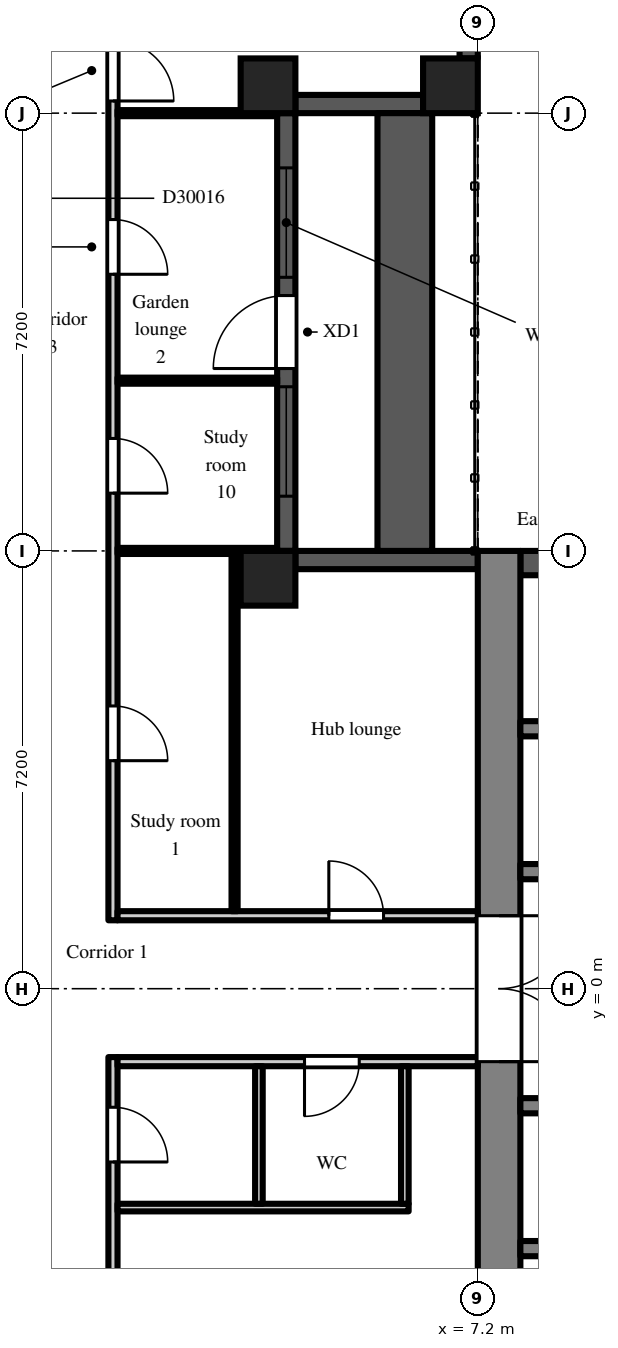
"""IFC4 building model, lengths in metres.
Left out: names, types, materials, properties, quantities, classifications, styles, units other than length and angle.
Written with IfcOpenShell. Run it as: python <this file> out.ifc"""

import sys

from ifc_helpers import new_model, si_unit, direction, frame, frame_2d, origin, origin_2d, place, context, subcontext, project, spatial, rectangle, extrude, element, fill, save


model = new_model("IFC4")
c1 = context("Model", 3, precision=1e-05, world=origin(), true_north=direction((0.0, 1.0)))
c2 = subcontext(c1, "Body", "Model", "MODEL_VIEW")
j1 = project(units=[si_unit("LENGTHUNIT", "METRE"), si_unit("PLANEANGLEUNIT", "RADIAN")], contexts=[c1])
p1 = place(None, origin())
s1 = spatial("IfcSite", under=j1, at=p1, CompositionType="ELEMENT")
p2 = place(p1, origin())
s2 = spatial("IfcBuilding", under=s1, at=p2, CompositionType="ELEMENT")
p3 = place(p2, frame((0.0, 0.0, 207.9)))
s3 = spatial("IfcBuildingStorey", under=s2, at=p3, CompositionType="ELEMENT", Elevation=207.9)
for number, where, z_axis, x_axis in (
    (1, (3.75, 6.75, 0.0), (0.0, 0.0, 1.0), (1.0, 0.0, 0.0)),
    (2, (3.75, 14.85, 0.0), (0.0, 0.0, 1.0), (1.0, 0.0, 0.0)),
    (3, (6.75, 14.85, 0.0), (0.0, 0.0, 1.0), (1.0, 0.0, 0.0)),
):
    element("IfcColumn", number, at=place(p3, frame(where, z_axis=z_axis, x_axis=x_axis)), inside=s3, PredefinedType="COLUMN", context=c2, shape_type="SweptSolid", body=[
        extrude(rectangle(XDim=0.9, YDim=0.9, at=origin_2d()), origin(), (0.0, 0.0, 1.0), 3.0),
    ])
p4 = place(p3, frame((7.2, 7.05, 0.0), z_axis=(0.0, 0.0, 1.0), x_axis=(-1.0, 0.0, 0.0)))
e4 = element("IfcWall", 4, at=p4, inside=s3, PredefinedType="SOLIDWALL", context=c2, shape_type="SweptSolid", body=[
    extrude(rectangle(XDim=3.0, YDim=0.3, at=frame_2d((1.5, 0.0))), origin(), (0.0, 0.0, 1.0), 2.3),
])
p5 = place(p3, frame((4.05, 7.2, 0.0), z_axis=(0.0, 0.0, 1.0), x_axis=(0.0, 1.0, 0.0)))
e5 = element("IfcWall", 5, at=p5, inside=s3, PredefinedType="SOLIDWALL", context=c2, shape_type="SweptSolid", body=[
    extrude(rectangle(XDim=7.2, YDim=0.3, at=frame_2d((3.6, 0.0))), origin(), (0.0, 0.0, 1.0), 2.3),
])
p6 = place(p5, frame((3.0, 0.0, 0.0)))
e6 = element("IfcOpeningElement", 6, at=p6, cuts=e5, PredefinedType="OPENING", context=c2, shape_type="SweptSolid", body=[
    extrude(rectangle(XDim=1.2, YDim=2.05, at=frame_2d((0.6, 1.025))), frame((0.0, 0.16, 0.0), z_axis=(0.0, -1.0, 0.0), x_axis=(1.0, 0.0, 0.0)), (0.0, 0.0, 1.0), 0.32),
])
p7 = place(p5, frame((0.9, 0.0, 0.2)))
e7 = element("IfcOpeningElement", 7, at=p7, cuts=e5, PredefinedType="OPENING", context=c2, shape_type="SweptSolid", body=[
    extrude(rectangle(XDim=1.8, YDim=1.85, at=frame_2d((0.9, 0.925))), frame((0.0, 0.16, 0.0), z_axis=(0.0, -1.0, 0.0), x_axis=(1.0, 0.0, 0.0)), (0.0, 0.0, 1.0), 0.32),
])
p8 = place(p5, frame((4.5, 0.0, 0.2)))
e8 = element("IfcOpeningElement", 8, at=p8, cuts=e5, PredefinedType="OPENING", context=c2, shape_type="SweptSolid", body=[
    extrude(rectangle(XDim=1.8, YDim=1.85, at=frame_2d((0.9, 0.925))), frame((0.0, 0.16, 0.0), z_axis=(0.0, -1.0, 0.0), x_axis=(1.0, 0.0, 0.0)), (0.0, 0.0, 1.0), 0.32),
])
p9 = place(p3, frame((4.2, 14.55, 0.0), z_axis=(0.0, 0.0, 1.0), x_axis=(1.0, 0.0, 0.0)))
e9 = element("IfcWall", 9, at=p9, inside=s3, PredefinedType="SOLIDWALL", context=c2, shape_type="SweptSolid", body=[
    extrude(rectangle(XDim=2.1, YDim=0.3, at=frame_2d((1.05, 0.0))), origin(), (0.0, 0.0, 1.0), 2.3),
])
p10 = place(p3, frame((7.05, 15.3, 0.0), z_axis=(0.0, 0.0, 1.0), x_axis=(0.0, 1.0, 0.0)))
e10 = element("IfcWall", 10, at=p10, inside=s3, PredefinedType="SOLIDWALL", context=c2, shape_type="SweptSolid", body=[
    extrude(rectangle(XDim=1.8, YDim=0.3, at=frame_2d((0.9, 0.0))), origin(), (0.0, 0.0, 1.0), 2.3),
])
p11 = place(p10, frame((0.3, 0.0, 0.2)))
e11 = element("IfcOpeningElement", 11, at=p11, cuts=e10, PredefinedType="OPENING", context=c2, shape_type="SweptSolid", body=[
    extrude(rectangle(XDim=1.2, YDim=1.85, at=frame_2d((0.6, 0.925))), frame((0.0, 0.16, 0.0), z_axis=(0.0, -1.0, 0.0), x_axis=(1.0, 0.0, 0.0)), (0.0, 0.0, 1.0), 0.32),
])
p12 = place(p3, frame((6.0, 7.2, 0.0), z_axis=(0.0, 0.0, 1.0), x_axis=(0.0, 1.0, 0.0)))
e12 = element("IfcWall", 12, at=p12, inside=s3, PredefinedType="PARAPET", context=c2, shape_type="SweptSolid", body=[
    extrude(rectangle(XDim=7.2, YDim=0.9, at=frame_2d((3.6, 0.0))), origin(), (0.0, 0.0, 1.0), 0.8),
])
p13 = place(p3, frame((7.55, -7.2, 0.0), z_axis=(0.0, 0.0, 1.0), x_axis=(0.0, 1.0, 0.0)))
e13 = element("IfcWall", 13, at=p13, inside=s3, PredefinedType="SHEAR", context=c2, shape_type="SweptSolid", body=[
    extrude(rectangle(XDim=14.4, YDim=0.7, at=frame_2d((7.2, 0.0))), origin(), (0.0, 0.0, 1.0), 2.6),
])
p14 = place(p13, frame((6.0, 0.0, 0.0)))
e14 = element("IfcOpeningElement", 14, at=p14, cuts=e13, PredefinedType="OPENING", context=c2, shape_type="SweptSolid", body=[
    extrude(rectangle(XDim=2.4, YDim=2.2, at=frame_2d((1.2, 1.1))), frame((0.0, 0.36, 0.0), z_axis=(0.0, -1.0, 0.0), x_axis=(1.0, 0.0, 0.0)), (0.0, 0.0, 1.0), 0.72),
])
p15 = place(p3, frame((7.9, 7.0, 0.0), z_axis=(0.0, 0.0, 1.0), x_axis=(1.0, 0.0, 0.0)))
e15 = element("IfcWall", 15, at=p15, inside=s3, PredefinedType="SHEAR", context=c2, shape_type="SweptSolid", body=[
    extrude(rectangle(XDim=12.95, YDim=0.4, at=frame_2d((6.475, 0.0))), origin(), (0.0, 0.0, 1.0), 2.6),
])
p16 = place(p3, frame((7.9, 1.925, 0.0), z_axis=(0.0, 0.0, 1.0), x_axis=(1.0, 0.0, 0.0)))
e16 = element("IfcWall", 16, at=p16, inside=s3, PredefinedType="SHEAR", context=c2, shape_type="SweptSolid", body=[
    extrude(rectangle(XDim=12.95, YDim=0.25, at=frame_2d((6.475, 0.0))), origin(), (0.0, 0.0, 1.0), 2.6),
])
p17 = place(p16, frame((4.825, 0.0, 0.0)))
e17 = element("IfcOpeningElement", 17, at=p17, cuts=e16, PredefinedType="OPENING", context=c2, shape_type="SweptSolid", body=[
    extrude(rectangle(XDim=1.1, YDim=2.1, at=frame_2d((0.55, 1.05))), frame((0.0, 0.135, 0.0), z_axis=(0.0, -1.0, 0.0), x_axis=(1.0, 0.0, 0.0)), (0.0, 0.0, 1.0), 0.27),
])
p18 = place(p16, frame((7.025, 0.0, 0.0)))
e18 = element("IfcOpeningElement", 18, at=p18, cuts=e16, PredefinedType="OPENING", context=c2, shape_type="SweptSolid", body=[
    extrude(rectangle(XDim=1.1, YDim=2.1, at=frame_2d((0.55, 1.05))), frame((0.0, 0.135, 0.0), z_axis=(0.0, -1.0, 0.0), x_axis=(1.0, 0.0, 0.0)), (0.0, 0.0, 1.0), 0.27),
])
p19 = place(p16, frame((9.225, 0.0, 0.0)))
e19 = element("IfcOpeningElement", 19, at=p19, cuts=e16, PredefinedType="OPENING", context=c2, shape_type="SweptSolid", body=[
    extrude(rectangle(XDim=1.1, YDim=2.1, at=frame_2d((0.55, 1.05))), frame((0.0, 0.135, 0.0), z_axis=(0.0, -1.0, 0.0), x_axis=(1.0, 0.0, 0.0)), (0.0, 0.0, 1.0), 0.27),
])
p20 = place(p16, frame((0.525, 0.0, 0.0)))
e20 = element("IfcOpeningElement", 20, at=p20, cuts=e16, PredefinedType="OPENING", context=c2, shape_type="SweptSolid", body=[
    extrude(rectangle(XDim=0.9, YDim=2.1, at=frame_2d((0.45, 1.05))), frame((0.0, 0.135, 0.0), z_axis=(0.0, -1.0, 0.0), x_axis=(1.0, 0.0, 0.0)), (0.0, 0.0, 1.0), 0.27),
])
p21 = place(p16, frame((2.625, 0.0, 0.0)))
e21 = element("IfcOpeningElement", 21, at=p21, cuts=e16, PredefinedType="OPENING", context=c2, shape_type="SweptSolid", body=[
    extrude(rectangle(XDim=1.1, YDim=2.1, at=frame_2d((0.55, 1.05))), frame((0.0, 0.135, 0.0), z_axis=(0.0, -1.0, 0.0), x_axis=(1.0, 0.0, 0.0)), (0.0, 0.0, 1.0), 0.27),
])
p22 = place(p16, frame((11.525, 0.0, 0.0)))
e22 = element("IfcOpeningElement", 22, at=p22, cuts=e16, PredefinedType="OPENING", context=c2, shape_type="SweptSolid", body=[
    extrude(rectangle(XDim=0.9, YDim=2.1, at=frame_2d((0.45, 1.05))), frame((0.0, 0.135, 0.0), z_axis=(0.0, -1.0, 0.0), x_axis=(1.0, 0.0, 0.0)), (0.0, 0.0, 1.0), 0.27),
])
p23 = place(p3, frame((7.9, 4.275, 0.0), z_axis=(0.0, 0.0, 1.0), x_axis=(1.0, 0.0, 0.0)))
e23 = element("IfcWall", 23, at=p23, inside=s3, PredefinedType="SHEAR", context=c2, shape_type="SweptSolid", body=[
    extrude(rectangle(XDim=1.95, YDim=0.25, at=frame_2d((0.975, 0.0))), origin(), (0.0, 0.0, 1.0), 2.6),
])
p24 = place(p3, frame((7.9, -1.925, 0.0), z_axis=(0.0, 0.0, 1.0), x_axis=(1.0, 0.0, 0.0)))
e24 = element("IfcWall", 24, at=p24, inside=s3, PredefinedType="SHEAR", context=c2, shape_type="SweptSolid", body=[
    extrude(rectangle(XDim=12.95, YDim=0.25, at=frame_2d((6.475, 0.0))), origin(), (0.0, 0.0, 1.0), 2.6),
])
p25 = place(p24, frame((0.525, 0.0, 0.0)))
e25 = element("IfcOpeningElement", 25, at=p25, cuts=e24, PredefinedType="OPENING", context=c2, shape_type="SweptSolid", body=[
    extrude(rectangle(XDim=0.9, YDim=2.1, at=frame_2d((0.45, 1.05))), frame((0.0, 0.135, 0.0), z_axis=(0.0, -1.0, 0.0), x_axis=(1.0, 0.0, 0.0)), (0.0, 0.0, 1.0), 0.27),
])
p26 = place(p24, frame((2.625, 0.0, 0.0)))
e26 = element("IfcOpeningElement", 26, at=p26, cuts=e24, PredefinedType="OPENING", context=c2, shape_type="SweptSolid", body=[
    extrude(rectangle(XDim=1.1, YDim=2.1, at=frame_2d((0.55, 1.05))), frame((0.0, 0.135, 0.0), z_axis=(0.0, -1.0, 0.0), x_axis=(1.0, 0.0, 0.0)), (0.0, 0.0, 1.0), 0.27),
])
p27 = place(p24, frame((4.925, 0.0, 0.0)))
e27 = element("IfcOpeningElement", 27, at=p27, cuts=e24, PredefinedType="OPENING", context=c2, shape_type="SweptSolid", body=[
    extrude(rectangle(XDim=0.9, YDim=2.1, at=frame_2d((0.45, 1.05))), frame((0.0, 0.135, 0.0), z_axis=(0.0, -1.0, 0.0), x_axis=(1.0, 0.0, 0.0)), (0.0, 0.0, 1.0), 0.27),
])
p28 = place(p24, frame((8.225, 0.0, 0.0)))
e28 = element("IfcOpeningElement", 28, at=p28, cuts=e24, PredefinedType="OPENING", context=c2, shape_type="SweptSolid", body=[
    extrude(rectangle(XDim=0.9, YDim=2.1, at=frame_2d((0.45, 1.05))), frame((0.0, 0.135, 0.0), z_axis=(0.0, -1.0, 0.0), x_axis=(1.0, 0.0, 0.0)), (0.0, 0.0, 1.0), 0.27),
])
p29 = place(p24, frame((11.525, 0.0, 0.0)))
e29 = element("IfcOpeningElement", 29, at=p29, cuts=e24, PredefinedType="OPENING", context=c2, shape_type="SweptSolid", body=[
    extrude(rectangle(XDim=0.9, YDim=2.1, at=frame_2d((0.45, 1.05))), frame((0.0, 0.135, 0.0), z_axis=(0.0, -1.0, 0.0), x_axis=(1.0, 0.0, 0.0)), (0.0, 0.0, 1.0), 0.27),
])
p30 = place(p3, frame((7.9, -4.275, 0.0), z_axis=(0.0, 0.0, 1.0), x_axis=(1.0, 0.0, 0.0)))
e30 = element("IfcWall", 30, at=p30, inside=s3, PredefinedType="SHEAR", context=c2, shape_type="SweptSolid", body=[
    extrude(rectangle(XDim=1.95, YDim=0.25, at=frame_2d((0.975, 0.0))), origin(), (0.0, 0.0, 1.0), 2.6),
])
p31 = place(p3, frame((1.2, -19.525, 0.0), z_axis=(0.0, 0.0, 1.0), x_axis=(0.0, 1.0, 0.0)))
e31 = element("IfcWall", 31, at=p31, inside=s3, PredefinedType="PARTITIONING", context=c2, shape_type="SweptSolid", body=[
    extrude(rectangle(XDim=18.4, YDim=0.15, at=frame_2d((9.2, 0.0))), origin(), (0.0, 0.0, 1.0), 2.6),
])
p32 = place(p31, frame((16.675, 0.0, 0.0)))
e32 = element("IfcOpeningElement", 32, at=p32, cuts=e31, PredefinedType="OPENING", context=c2, shape_type="SweptSolid", body=[
    extrude(rectangle(XDim=0.9, YDim=2.1, at=frame_2d((0.45, 1.05))), frame((0.0, 0.085, 0.0), z_axis=(0.0, -1.0, 0.0), x_axis=(1.0, 0.0, 0.0)), (0.0, 0.0, 1.0), 0.17),
])
p33 = place(p31, frame((13.675, 0.0, 0.0)))
e33 = element("IfcOpeningElement", 33, at=p33, cuts=e31, PredefinedType="OPENING", context=c2, shape_type="SweptSolid", body=[
    extrude(rectangle(XDim=0.9, YDim=2.1, at=frame_2d((0.45, 1.05))), frame((0.0, 0.085, 0.0), z_axis=(0.0, -1.0, 0.0), x_axis=(1.0, 0.0, 0.0)), (0.0, 0.0, 1.0), 0.17),
])
p34 = place(p31, frame((6.475, 0.0, 0.0)))
e34 = element("IfcOpeningElement", 34, at=p34, cuts=e31, PredefinedType="OPENING", context=c2, shape_type="SweptSolid", body=[
    extrude(rectangle(XDim=0.9, YDim=2.1, at=frame_2d((0.45, 1.05))), frame((0.0, 0.085, 0.0), z_axis=(0.0, -1.0, 0.0), x_axis=(1.0, 0.0, 0.0)), (0.0, 0.0, 1.0), 0.17),
])
p35 = place(p31, frame((1.625, 0.0, 0.0)))
e35 = element("IfcOpeningElement", 35, at=p35, cuts=e31, PredefinedType="OPENING", context=c2, shape_type="SweptSolid", body=[
    extrude(rectangle(XDim=1.8, YDim=2.1, at=frame_2d((0.9, 1.05))), frame((0.0, 0.085, 0.0), z_axis=(0.0, -1.0, 0.0), x_axis=(1.0, 0.0, 0.0)), (0.0, 0.0, 1.0), 0.17),
])
p36 = place(p3, frame((1.275, -3.6, 0.0), z_axis=(0.0, 0.0, 1.0), x_axis=(1.0, 0.0, 0.0)))
e36 = element("IfcWall", 36, at=p36, inside=s3, PredefinedType="PARTITIONING", context=c2, shape_type="SweptSolid", body=[
    extrude(rectangle(XDim=4.788, YDim=0.125, at=frame_2d((2.394, 0.0))), origin(), (0.0, 0.0, 1.0), 2.6),
])
p37 = place(p3, frame((1.275, -1.2, 0.0), z_axis=(0.0, 0.0, 1.0), x_axis=(1.0, 0.0, 0.0)))
e37 = element("IfcWall", 37, at=p37, inside=s3, PredefinedType="PARTITIONING", context=c2, shape_type="SweptSolid", body=[
    extrude(rectangle(XDim=5.925, YDim=0.15, at=frame_2d((2.962, 0.0))), origin(), (0.0, 0.0, 1.0), 2.6),
])
p38 = place(p37, frame((3.075, 0.0, 0.0)))
e38 = element("IfcOpeningElement", 38, at=p38, cuts=e37, PredefinedType="OPENING", context=c2, shape_type="SweptSolid", body=[
    extrude(rectangle(XDim=0.9, YDim=2.1, at=frame_2d((0.45, 1.05))), frame((0.0, 0.085, 0.0), z_axis=(0.0, -1.0, 0.0), x_axis=(1.0, 0.0, 0.0)), (0.0, 0.0, 1.0), 0.17),
])
p39 = place(p3, frame((1.2, 1.125, 0.0), z_axis=(0.0, 0.0, 1.0), x_axis=(0.0, 1.0, 0.0)))
e39 = element("IfcWall", 39, at=p39, inside=s3, PredefinedType="PARTITIONING", context=c2, shape_type="SweptSolid", body=[
    extrude(rectangle(XDim=18.4, YDim=0.15, at=frame_2d((9.2, 0.0))), origin(), (0.0, 0.0, 1.0), 2.6),
])
p40 = place(p39, frame((2.625, 0.0, 0.0)))
e40 = element("IfcOpeningElement", 40, at=p40, cuts=e39, PredefinedType="OPENING", context=c2, shape_type="SweptSolid", body=[
    extrude(rectangle(XDim=0.9, YDim=2.1, at=frame_2d((0.45, 1.05))), frame((0.0, 0.085, 0.0), z_axis=(0.0, -1.0, 0.0), x_axis=(1.0, 0.0, 0.0)), (0.0, 0.0, 1.0), 0.17),
])
p41 = place(p39, frame((7.025, 0.0, 0.0)))
e41 = element("IfcOpeningElement", 41, at=p41, cuts=e39, PredefinedType="OPENING", context=c2, shape_type="SweptSolid", body=[
    extrude(rectangle(XDim=0.9, YDim=2.1, at=frame_2d((0.45, 1.05))), frame((0.0, 0.085, 0.0), z_axis=(0.0, -1.0, 0.0), x_axis=(1.0, 0.0, 0.0)), (0.0, 0.0, 1.0), 0.17),
])
p42 = place(p39, frame((10.625, 0.0, 0.0)))
e42 = element("IfcOpeningElement", 42, at=p42, cuts=e39, PredefinedType="OPENING", context=c2, shape_type="SweptSolid", body=[
    extrude(rectangle(XDim=0.9, YDim=2.1, at=frame_2d((0.45, 1.05))), frame((0.0, 0.085, 0.0), z_axis=(0.0, -1.0, 0.0), x_axis=(1.0, 0.0, 0.0)), (0.0, 0.0, 1.0), 0.17),
])
p43 = place(p39, frame((13.475, 0.0, 0.0)))
e43 = element("IfcOpeningElement", 43, at=p43, cuts=e39, PredefinedType="OPENING", context=c2, shape_type="SweptSolid", body=[
    extrude(rectangle(XDim=1.0, YDim=2.1, at=frame_2d((0.5, 1.05))), frame((0.0, 0.085, 0.0), z_axis=(0.0, -1.0, 0.0), x_axis=(1.0, 0.0, 0.0)), (0.0, 0.0, 1.0), 0.17),
])
p44 = place(p3, frame((1.275, 1.2, 0.0), z_axis=(0.0, 0.0, 1.0), x_axis=(1.0, 0.0, 0.0)))
e44 = element("IfcWall", 44, at=p44, inside=s3, PredefinedType="PARTITIONING", context=c2, shape_type="SweptSolid", body=[
    extrude(rectangle(XDim=5.925, YDim=0.15, at=frame_2d((2.962, 0.0))), origin(), (0.0, 0.0, 1.0), 2.6),
])
p45 = place(p44, frame((3.475, 0.0, 0.0)))
e45 = element("IfcOpeningElement", 45, at=p45, cuts=e44, PredefinedType="OPENING", context=c2, shape_type="SweptSolid", body=[
    extrude(rectangle(XDim=0.9, YDim=2.1, at=frame_2d((0.45, 1.05))), frame((0.0, 0.085, 0.0), z_axis=(0.0, -1.0, 0.0), x_axis=(1.0, 0.0, 0.0)), (0.0, 0.0, 1.0), 0.17),
])
for number, where, z_axis, x_axis in (
    (46, (1.275, 7.2, 0.0), (0.0, 0.0, 1.0), (1.0, 0.0, 0.0)),
    (47, (1.275, 10.0, 0.0), (0.0, 0.0, 1.0), (1.0, 0.0, 0.0)),
    (48, (1.275, 14.4, 0.0), (0.0, 0.0, 1.0), (1.0, 0.0, 0.0)),
):
    element("IfcWall", number, at=place(p3, frame(where, z_axis=z_axis, x_axis=x_axis)), inside=s3, PredefinedType="PARTITIONING", context=c2, shape_type="SweptSolid", body=[
        extrude(rectangle(XDim=2.625, YDim=0.1, at=frame_2d((1.312, 0.0))), origin(), (0.0, 0.0, 1.0), 2.6),
    ])
p46 = place(p3, frame((3.2, 1.275, 0.0), z_axis=(0.0, 0.0, 1.0), x_axis=(0.0, 1.0, 0.0)))
e49 = element("IfcWall", 49, at=p46, inside=s3, PredefinedType="PARTITIONING", context=c2, shape_type="SweptSolid", body=[
    extrude(rectangle(XDim=5.875, YDim=0.1, at=frame_2d((2.938, 0.0))), origin(), (0.0, 0.0, 1.0), 2.6),
])
for number, where, z_axis, x_axis in (
    (50, (3.6, -3.538, 0.0), (0.0, 0.0, 1.0), (0.0, 1.0, 0.0)),
    (51, (6.0, -3.538, 0.0), (0.0, 0.0, 1.0), (0.0, 1.0, 0.0)),
):
    element("IfcWall", number, at=place(p3, frame(where, z_axis=z_axis, x_axis=x_axis)), inside=s3, PredefinedType="PARTITIONING", context=c2, shape_type="SweptSolid", body=[
        extrude(rectangle(XDim=2.263, YDim=0.125, at=frame_2d((1.131, 0.0))), origin(), (0.0, 0.0, 1.0), 2.6),
    ])
p47 = place(p6, origin())
e52 = element("IfcDoor", 52, at=p47, inside=s3, OperationType="SINGLE_SWING_LEFT", PredefinedType="DOOR", context=c2, shape_type="SweptSolid", body=[
    extrude(rectangle(XDim=1.2, YDim=2.05, at=frame_2d((0.6, 1.025))), frame((0.0, 0.025, 0.0), z_axis=(0.0, -1.0, 0.0), x_axis=(1.0, 0.0, 0.0)), (0.0, 0.0, 1.0), 0.05),
])
fill(e6, e52)
p48 = place(p7, origin())
e53 = element("IfcWindow", 53, at=p48, inside=s3, PartitioningType="SINGLE_PANEL", PredefinedType="WINDOW", context=c2, shape_type="SweptSolid", body=[
    extrude(rectangle(XDim=1.8, YDim=1.85, at=frame_2d((0.9, 0.925))), frame((0.0, 0.03, 0.0), z_axis=(0.0, -1.0, 0.0), x_axis=(1.0, 0.0, 0.0)), (0.0, 0.0, 1.0), 0.06),
])
fill(e7, e53)
p49 = place(p8, origin())
e54 = element("IfcWindow", 54, at=p49, inside=s3, PartitioningType="SINGLE_PANEL", PredefinedType="WINDOW", context=c2, shape_type="SweptSolid", body=[
    extrude(rectangle(XDim=1.8, YDim=1.85, at=frame_2d((0.9, 0.925))), frame((0.0, 0.03, 0.0), z_axis=(0.0, -1.0, 0.0), x_axis=(1.0, 0.0, 0.0)), (0.0, 0.0, 1.0), 0.06),
])
fill(e8, e54)
p50 = place(p14, frame((2.4, 0.0, 0.0), z_axis=(0.0, 0.0, 1.0), x_axis=(-1.0, 0.0, 0.0)))
e55 = element("IfcDoor", 55, at=p50, inside=s3, OperationType="DOUBLE_DOOR_DOUBLE_SWING", PredefinedType="DOOR", context=c2, shape_type="SweptSolid", body=[
    extrude(rectangle(XDim=2.4, YDim=2.2, at=frame_2d((1.2, 1.1))), frame((0.0, 0.025, 0.0), z_axis=(0.0, -1.0, 0.0), x_axis=(1.0, 0.0, 0.0)), (0.0, 0.0, 1.0), 0.05),
])
fill(e14, e55)
p51 = place(p40, frame((0.9, 0.0, 0.0), z_axis=(0.0, 0.0, 1.0), x_axis=(-1.0, 0.0, 0.0)))
e56 = element("IfcDoor", 56, at=p51, inside=s3, OperationType="SINGLE_SWING_RIGHT", PredefinedType="DOOR", context=c2, shape_type="SweptSolid", body=[
    extrude(rectangle(XDim=0.9, YDim=2.1, at=frame_2d((0.45, 1.05))), frame((0.0, 0.025, 0.0), z_axis=(0.0, -1.0, 0.0), x_axis=(1.0, 0.0, 0.0)), (0.0, 0.0, 1.0), 0.05),
])
fill(e40, e56)
p52 = place(p45, origin())
e57 = element("IfcDoor", 57, at=p52, inside=s3, OperationType="SINGLE_SWING_LEFT", PredefinedType="DOOR", context=c2, shape_type="SweptSolid", body=[
    extrude(rectangle(XDim=0.9, YDim=2.1, at=frame_2d((0.45, 1.05))), frame((0.0, 0.025, 0.0), z_axis=(0.0, -1.0, 0.0), x_axis=(1.0, 0.0, 0.0)), (0.0, 0.0, 1.0), 0.05),
])
fill(e45, e57)
p53 = place(p32, frame((0.9, 0.0, 0.0), z_axis=(0.0, 0.0, 1.0), x_axis=(-1.0, 0.0, 0.0)))
e58 = element("IfcDoor", 58, at=p53, inside=s3, OperationType="SINGLE_SWING_RIGHT", PredefinedType="DOOR", context=c2, shape_type="SweptSolid", body=[
    extrude(rectangle(XDim=0.9, YDim=2.1, at=frame_2d((0.45, 1.05))), frame((0.0, 0.025, 0.0), z_axis=(0.0, -1.0, 0.0), x_axis=(1.0, 0.0, 0.0)), (0.0, 0.0, 1.0), 0.05),
])
fill(e32, e58)
p54 = place(p38, frame((0.9, 0.0, 0.0), z_axis=(0.0, 0.0, 1.0), x_axis=(-1.0, 0.0, 0.0)))
e59 = element("IfcDoor", 59, at=p54, inside=s3, OperationType="SINGLE_SWING_RIGHT", PredefinedType="DOOR", context=c2, shape_type="SweptSolid", body=[
    extrude(rectangle(XDim=0.9, YDim=2.1, at=frame_2d((0.45, 1.05))), frame((0.0, 0.025, 0.0), z_axis=(0.0, -1.0, 0.0), x_axis=(1.0, 0.0, 0.0)), (0.0, 0.0, 1.0), 0.05),
])
fill(e38, e59)
p55 = place(p41, frame((0.9, 0.0, 0.0), z_axis=(0.0, 0.0, 1.0), x_axis=(-1.0, 0.0, 0.0)))
e60 = element("IfcDoor", 60, at=p55, inside=s3, OperationType="SINGLE_SWING_RIGHT", PredefinedType="DOOR", context=c2, shape_type="SweptSolid", body=[
    extrude(rectangle(XDim=0.9, YDim=2.1, at=frame_2d((0.45, 1.05))), frame((0.0, 0.025, 0.0), z_axis=(0.0, -1.0, 0.0), x_axis=(1.0, 0.0, 0.0)), (0.0, 0.0, 1.0), 0.05),
])
fill(e41, e60)
p56 = place(p42, frame((0.9, 0.0, 0.0), z_axis=(0.0, 0.0, 1.0), x_axis=(-1.0, 0.0, 0.0)))
e61 = element("IfcDoor", 61, at=p56, inside=s3, OperationType="SINGLE_SWING_RIGHT", PredefinedType="DOOR", context=c2, shape_type="SweptSolid", body=[
    extrude(rectangle(XDim=0.9, YDim=2.1, at=frame_2d((0.45, 1.05))), frame((0.0, 0.025, 0.0), z_axis=(0.0, -1.0, 0.0), x_axis=(1.0, 0.0, 0.0)), (0.0, 0.0, 1.0), 0.05),
])
fill(e42, e61)
p57 = place(p43, frame((1.0, 0.0, 0.0), z_axis=(0.0, 0.0, 1.0), x_axis=(-1.0, 0.0, 0.0)))
e62 = element("IfcDoor", 62, at=p57, inside=s3, OperationType="SINGLE_SWING_RIGHT", PredefinedType="DOOR", context=c2, shape_type="SweptSolid", body=[
    extrude(rectangle(XDim=1.0, YDim=2.1, at=frame_2d((0.5, 1.05))), frame((0.0, 0.025, 0.0), z_axis=(0.0, -1.0, 0.0), x_axis=(1.0, 0.0, 0.0)), (0.0, 0.0, 1.0), 0.05),
])
fill(e43, e62)
save(model, sys.argv[1])
